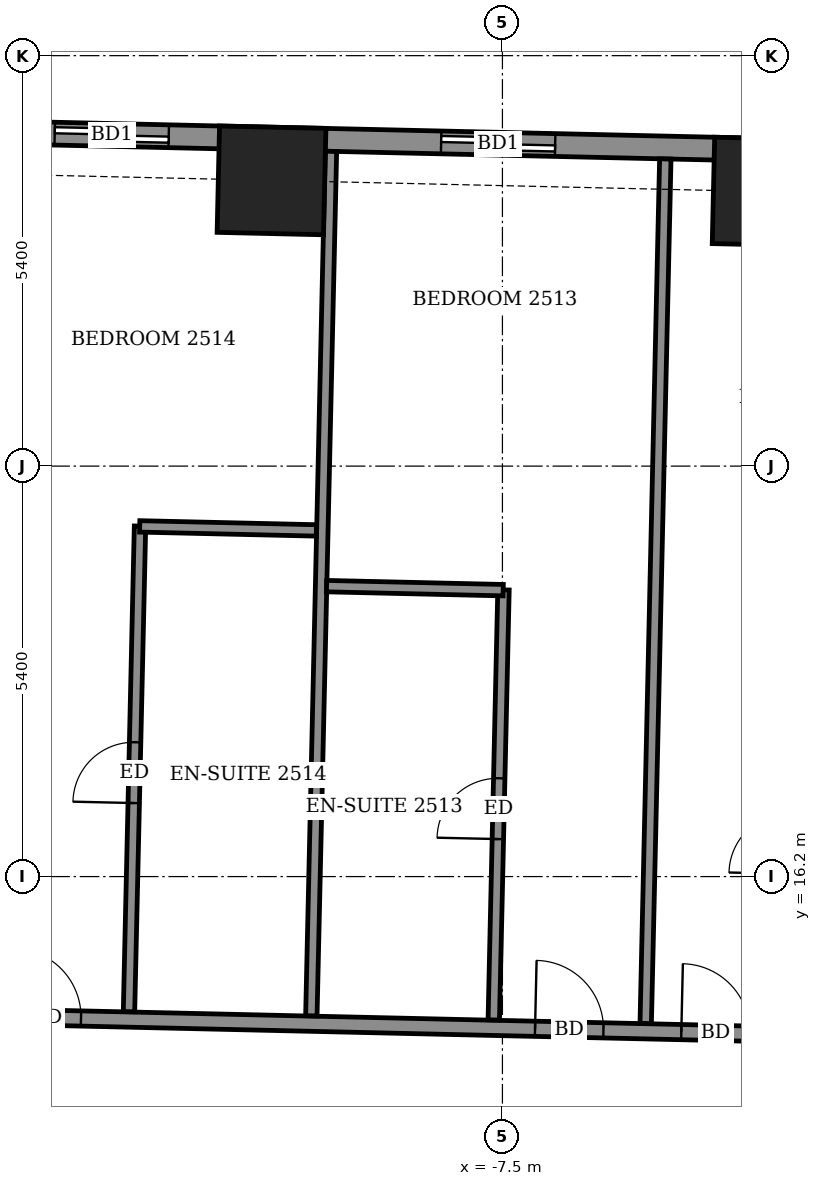
"""IFC4 building model, lengths in metres.
Left out: names, types, materials, properties, quantities, classifications, styles, units other than length and angle.
Written with IfcOpenShell. Run it as: python <this file> out.ifc"""

import sys

from ifc_helpers import new_model, si_unit, direction, frame, frame_2d, origin, origin_2d, place, context, subcontext, project, spatial, rectangle, extrude, element, fill, save


model = new_model("IFC4")
c1 = context("Model", 3, precision=1e-05, world=origin(), true_north=direction((0.0, 1.0)))
c2 = subcontext(c1, "Body", "Model", "MODEL_VIEW")
j1 = project(units=[si_unit("LENGTHUNIT", "METRE"), si_unit("PLANEANGLEUNIT", "RADIAN")], contexts=[c1])
p1 = place(None, origin())
s1 = spatial("IfcSite", under=j1, at=p1, CompositionType="ELEMENT")
p2 = place(p1, origin())
s2 = spatial("IfcBuilding", under=s1, at=p2, CompositionType="ELEMENT")
p3 = place(p2, frame((0.0, 0.0, 101.9)))
s3 = spatial("IfcBuildingStorey", under=s2, at=p3, CompositionType="ELEMENT", Elevation=101.9)
for number, where, z_axis, x_axis in (
    (1, (-4.024, 25.211, -0.55), (0.0, 0.0, 1.0), (-1.0, 0.023, 0.0)),
    (2, (-10.538, 25.359, -0.55), (0.0, 0.0, 1.0), (-1.0, 0.023, 0.0)),
):
    element("IfcColumn", number, at=place(p3, frame(where, z_axis=z_axis, x_axis=x_axis)), inside=s3, PredefinedType="COLUMN", context=c2, shape_type="SweptSolid", body=[
        extrude(rectangle(XDim=1.4, YDim=1.4, at=origin_2d()), origin(), (0.0, 0.0, 1.0), 3.6),
    ])
p4 = place(p3, frame((21.894, 25.173, 0.0), z_axis=(0.0, 0.0, 1.0), x_axis=(-0.999742661083, 0.022685052594, 0.0)))
e3 = element("IfcWall", 3, at=p4, inside=s3, PredefinedType="SOLIDWALL", context=c2, shape_type="SweptSolid", body=[
    extrude(rectangle(XDim=45.309, YDim=0.3, at=frame_2d((22.654, 0.0))), origin(), (0.0, 0.0, 1.0), 3.05),
])
p5 = place(p4, frame((2.319, 0.0, 0.0)))
e4 = element("IfcOpeningElement", 4, at=p5, cuts=e3, PredefinedType="OPENING", context=c2, shape_type="SweptSolid", body=[
    extrude(rectangle(XDim=1.5, YDim=2.4, at=frame_2d((0.75, 1.2))), frame((0.0, 0.16, 0.0), z_axis=(0.0, -1.0, 0.0), x_axis=(1.0, 0.0, 0.0)), (0.0, 0.0, 1.0), 0.32),
])
p6 = place(p4, frame((7.437, 0.0, 0.0)))
e5 = element("IfcOpeningElement", 5, at=p6, cuts=e3, PredefinedType="OPENING", context=c2, shape_type="SweptSolid", body=[
    extrude(rectangle(XDim=1.5, YDim=2.4, at=frame_2d((0.75, 1.2))), frame((0.0, 0.16, 0.0), z_axis=(0.0, -1.0, 0.0), x_axis=(1.0, 0.0, 0.0)), (0.0, 0.0, 1.0), 0.32),
])
p7 = place(p4, frame((10.244, 0.0, 0.0)))
e6 = element("IfcOpeningElement", 6, at=p7, cuts=e3, PredefinedType="OPENING", context=c2, shape_type="SweptSolid", body=[
    extrude(rectangle(XDim=1.5, YDim=2.4, at=frame_2d((0.75, 1.2))), frame((0.0, 0.16, 0.0), z_axis=(0.0, -1.0, 0.0), x_axis=(1.0, 0.0, 0.0)), (0.0, 0.0, 1.0), 0.32),
])
p8 = place(p4, frame((15.583, 0.0, 0.0)))
e7 = element("IfcOpeningElement", 7, at=p8, cuts=e3, PredefinedType="OPENING", context=c2, shape_type="SweptSolid", body=[
    extrude(rectangle(XDim=1.5, YDim=2.4, at=frame_2d((0.75, 1.2))), frame((0.0, 0.16, 0.0), z_axis=(0.0, -1.0, 0.0), x_axis=(1.0, 0.0, 0.0)), (0.0, 0.0, 1.0), 0.32),
])
p9 = place(p4, frame((20.677, 0.0, 0.0)))
e8 = element("IfcOpeningElement", 8, at=p9, cuts=e3, PredefinedType="OPENING", context=c2, shape_type="SweptSolid", body=[
    extrude(rectangle(XDim=1.5, YDim=2.4, at=frame_2d((0.75, 1.2))), frame((0.0, 0.16, 0.0), z_axis=(0.0, -1.0, 0.0), x_axis=(1.0, 0.0, 0.0)), (0.0, 0.0, 1.0), 0.32),
])
p10 = place(p4, frame((23.485, 0.0, 0.0)))
e9 = element("IfcOpeningElement", 9, at=p10, cuts=e3, PredefinedType="OPENING", context=c2, shape_type="SweptSolid", body=[
    extrude(rectangle(XDim=1.5, YDim=2.4, at=frame_2d((0.75, 1.2))), frame((0.0, 0.16, 0.0), z_axis=(0.0, -1.0, 0.0), x_axis=(1.0, 0.0, 0.0)), (0.0, 0.0, 1.0), 0.32),
])
p11 = place(p4, frame((28.708, 0.0, 0.0)))
e10 = element("IfcOpeningElement", 10, at=p11, cuts=e3, PredefinedType="OPENING", context=c2, shape_type="SweptSolid", body=[
    extrude(rectangle(XDim=1.5, YDim=2.4, at=frame_2d((0.75, 1.2))), frame((0.0, 0.16, 0.0), z_axis=(0.0, -1.0, 0.0), x_axis=(1.0, 0.0, 0.0)), (0.0, 0.0, 1.0), 0.32),
])
p12 = place(p4, frame((33.793, 0.0, 0.0)))
e11 = element("IfcOpeningElement", 11, at=p12, cuts=e3, PredefinedType="OPENING", context=c2, shape_type="SweptSolid", body=[
    extrude(rectangle(XDim=1.5, YDim=2.4, at=frame_2d((0.75, 1.2))), frame((0.0, 0.16, 0.0), z_axis=(0.0, -1.0, 0.0), x_axis=(1.0, 0.0, 0.0)), (0.0, 0.0, 1.0), 0.32),
])
p13 = place(p4, frame((36.6, 0.0, 0.0)))
e12 = element("IfcOpeningElement", 12, at=p13, cuts=e3, PredefinedType="OPENING", context=c2, shape_type="SweptSolid", body=[
    extrude(rectangle(XDim=1.5, YDim=2.4, at=frame_2d((0.75, 1.2))), frame((0.0, 0.16, 0.0), z_axis=(0.0, -1.0, 0.0), x_axis=(1.0, 0.0, 0.0)), (0.0, 0.0, 1.0), 0.32),
])
p14 = place(p4, frame((41.318, 0.0, 0.9)))
e13 = element("IfcOpeningElement", 13, at=p14, cuts=e3, PredefinedType="OPENING", context=c2, shape_type="SweptSolid", body=[
    extrude(rectangle(XDim=2.4, YDim=1.5, at=frame_2d((1.2, 0.75))), frame((0.0, 0.16, 0.0), z_axis=(0.0, -1.0, 0.0), x_axis=(1.0, 0.0, 0.0)), (0.0, 0.0, 1.0), 0.32),
])
p15 = place(p3, frame((-26.316, 14.634, 0.0), z_axis=(0.0, 0.0, 1.0), x_axis=(0.999742734556, -0.02268181435, 0.0)))
e14 = element("IfcWall", 14, at=p15, inside=s3, PredefinedType="PARTITIONING", context=c2, shape_type="SweptSolid", body=[
    extrude(rectangle(XDim=50.708, YDim=0.2, at=frame_2d((25.354, 0.0))), origin(), (0.0, 0.0, 1.0), 3.05),
])
p16 = place(p15, frame((48.229, 0.0, 0.0)))
e15 = element("IfcOpeningElement", 15, at=p16, cuts=e14, PredefinedType="OPENING", context=c2, shape_type="SweptSolid", body=[
    extrude(rectangle(XDim=1.0, YDim=2.1, at=frame_2d((0.5, 1.05))), frame((0.0, 0.11, 0.0), z_axis=(0.0, -1.0, 0.0), x_axis=(1.0, 0.0, 0.0)), (0.0, 0.0, 1.0), 0.22),
])
p17 = place(p15, frame((43.6, 0.0, 0.0)))
e16 = element("IfcOpeningElement", 16, at=p17, cuts=e14, PredefinedType="OPENING", context=c2, shape_type="SweptSolid", body=[
    extrude(rectangle(XDim=0.9, YDim=2.1, at=frame_2d((0.45, 1.05))), frame((0.0, 0.11, 0.0), z_axis=(0.0, -1.0, 0.0), x_axis=(1.0, 0.0, 0.0)), (0.0, 0.0, 1.0), 0.22),
])
p18 = place(p15, frame((38.925, 0.0, 0.0)))
e17 = element("IfcOpeningElement", 17, at=p18, cuts=e14, PredefinedType="OPENING", context=c2, shape_type="SweptSolid", body=[
    extrude(rectangle(XDim=0.9, YDim=2.1, at=frame_2d((0.45, 1.05))), frame((0.0, 0.11, 0.0), z_axis=(0.0, -1.0, 0.0), x_axis=(1.0, 0.0, 0.0)), (0.0, 0.0, 1.0), 0.22),
])
p19 = place(p15, frame((36.9, 0.0, 0.0)))
e18 = element("IfcOpeningElement", 18, at=p19, cuts=e14, PredefinedType="OPENING", context=c2, shape_type="SweptSolid", body=[
    extrude(rectangle(XDim=0.9, YDim=2.1, at=frame_2d((0.45, 1.05))), frame((0.0, 0.11, 0.0), z_axis=(0.0, -1.0, 0.0), x_axis=(1.0, 0.0, 0.0)), (0.0, 0.0, 1.0), 0.22),
])
p20 = place(p15, frame((29.975, 0.0, 0.0)))
e19 = element("IfcOpeningElement", 19, at=p20, cuts=e14, PredefinedType="OPENING", context=c2, shape_type="SweptSolid", body=[
    extrude(rectangle(XDim=0.9, YDim=2.1, at=frame_2d((0.45, 1.05))), frame((0.0, 0.11, 0.0), z_axis=(0.0, -1.0, 0.0), x_axis=(1.0, 0.0, 0.0)), (0.0, 0.0, 1.0), 0.22),
])
p21 = place(p15, frame((27.9, 0.0, 0.0)))
e20 = element("IfcOpeningElement", 20, at=p21, cuts=e14, PredefinedType="OPENING", context=c2, shape_type="SweptSolid", body=[
    extrude(rectangle(XDim=0.9, YDim=2.1, at=frame_2d((0.45, 1.05))), frame((0.0, 0.11, 0.0), z_axis=(0.0, -1.0, 0.0), x_axis=(1.0, 0.0, 0.0)), (0.0, 0.0, 1.0), 0.22),
])
p22 = place(p15, frame((21.175, 0.0, 0.0)))
e21 = element("IfcOpeningElement", 21, at=p22, cuts=e14, PredefinedType="OPENING", context=c2, shape_type="SweptSolid", body=[
    extrude(rectangle(XDim=0.9, YDim=2.1, at=frame_2d((0.45, 1.05))), frame((0.0, 0.11, 0.0), z_axis=(0.0, -1.0, 0.0), x_axis=(1.0, 0.0, 0.0)), (0.0, 0.0, 1.0), 0.22),
])
p23 = place(p15, frame((19.25, 0.0, 0.0)))
e22 = element("IfcOpeningElement", 22, at=p23, cuts=e14, PredefinedType="OPENING", context=c2, shape_type="SweptSolid", body=[
    extrude(rectangle(XDim=0.9, YDim=2.1, at=frame_2d((0.45, 1.05))), frame((0.0, 0.11, 0.0), z_axis=(0.0, -1.0, 0.0), x_axis=(1.0, 0.0, 0.0)), (0.0, 0.0, 1.0), 0.22),
])
p24 = place(p15, frame((12.375, 0.0, 0.0)))
e23 = element("IfcOpeningElement", 23, at=p24, cuts=e14, PredefinedType="OPENING", context=c2, shape_type="SweptSolid", body=[
    extrude(rectangle(XDim=0.9, YDim=2.1, at=frame_2d((0.45, 1.05))), frame((0.0, 0.11, 0.0), z_axis=(0.0, -1.0, 0.0), x_axis=(1.0, 0.0, 0.0)), (0.0, 0.0, 1.0), 0.22),
])
p25 = place(p15, frame((10.225, 0.0, 0.0)))
e24 = element("IfcOpeningElement", 24, at=p25, cuts=e14, PredefinedType="OPENING", context=c2, shape_type="SweptSolid", body=[
    extrude(rectangle(XDim=0.9, YDim=2.1, at=frame_2d((0.45, 1.05))), frame((0.0, 0.11, 0.0), z_axis=(0.0, -1.0, 0.0), x_axis=(1.0, 0.0, 0.0)), (0.0, 0.0, 1.0), 0.22),
])
p26 = place(p15, frame((0.85, 0.0, 0.0)))
e25 = element("IfcOpeningElement", 25, at=p26, cuts=e14, PredefinedType="OPENING", context=c2, shape_type="SweptSolid", body=[
    extrude(rectangle(XDim=1.0, YDim=2.1, at=frame_2d((0.5, 1.05))), frame((0.0, 0.11, 0.0), z_axis=(0.0, -1.0, 0.0), x_axis=(1.0, 0.0, 0.0)), (0.0, 0.0, 1.0), 0.22),
])
p27 = place(p15, frame((5.55, 0.0, 0.0)))
e26 = element("IfcOpeningElement", 26, at=p27, cuts=e14, PredefinedType="OPENING", context=c2, shape_type="SweptSolid", body=[
    extrude(rectangle(XDim=0.9, YDim=2.1, at=frame_2d((0.45, 1.05))), frame((0.0, 0.11, 0.0), z_axis=(0.0, -1.0, 0.0), x_axis=(1.0, 0.0, 0.0)), (0.0, 0.0, 1.0), 0.22),
])
p28 = place(p3, frame((-12.413, 14.423, 0.0), z_axis=(0.0, 0.0, 1.0), x_axis=(0.022696235044, 0.99974240728, 0.0)))
e27 = element("IfcWall", 27, at=p28, inside=s3, PredefinedType="PARTITIONING", context=c2, shape_type="SweptSolid", body=[
    extrude(rectangle(XDim=6.39, YDim=0.15, at=frame_2d((3.195, 0.0))), origin(), (0.0, 0.0, 1.0), 3.05),
])
p29 = place(p28, frame((2.745, 0.0, 0.0)))
e28 = element("IfcOpeningElement", 28, at=p29, cuts=e27, PredefinedType="OPENING", context=c2, shape_type="SweptSolid", body=[
    extrude(rectangle(XDim=0.8, YDim=2.1, at=frame_2d((0.4, 1.05))), frame((0.0, 0.085, 0.0), z_axis=(0.0, -1.0, 0.0), x_axis=(1.0, 0.0, 0.0)), (0.0, 0.0, 1.0), 0.17),
])
p30 = place(p3, frame((-10.014, 14.368, 0.0), z_axis=(0.0, 0.0, 1.0), x_axis=(0.022662905301, 0.999743163379, 0.0)))
e29 = element("IfcWall", 29, at=p30, inside=s3, PredefinedType="PARTITIONING", context=c2, shape_type="SweptSolid", body=[
    extrude(rectangle(XDim=11.376, YDim=0.15, at=frame_2d((5.688, 0.0))), origin(), (0.0, 0.0, 1.0), 2.55),
])
p31 = place(p3, frame((-7.614, 14.314, 0.0), z_axis=(0.0, 0.0, 1.0), x_axis=(0.022604794261, 0.999744478993, 0.0)))
e30 = element("IfcWall", 30, at=p31, inside=s3, PredefinedType="PARTITIONING", context=c2, shape_type="SweptSolid", body=[
    extrude(rectangle(XDim=5.659, YDim=0.15, at=frame_2d((2.83, 0.0))), origin(), (0.0, 0.0, 1.0), 3.05),
])
p32 = place(p31, frame((2.38, 0.0, 0.0)))
e31 = element("IfcOpeningElement", 31, at=p32, cuts=e30, PredefinedType="OPENING", context=c2, shape_type="SweptSolid", body=[
    extrude(rectangle(XDim=0.8, YDim=2.1, at=frame_2d((0.4, 1.05))), frame((0.0, 0.085, 0.0), z_axis=(0.0, -1.0, 0.0), x_axis=(1.0, 0.0, 0.0)), (0.0, 0.0, 1.0), 0.17),
])
p33 = place(p3, frame((-5.615, 14.268, 0.0), z_axis=(0.0, 0.0, 1.0), x_axis=(0.022684355347, 0.999742676904, 0.0)))
e32 = element("IfcWall", 32, at=p33, inside=s3, PredefinedType="PARTITIONING", context=c2, shape_type="SweptSolid", body=[
    extrude(rectangle(XDim=11.376, YDim=0.15, at=frame_2d((5.688, 0.0))), origin(), (0.0, 0.0, 1.0), 2.55),
])
for number, where, z_axis, x_axis in (
    (33, (-9.814, 20.021, 0.0), (0.0, 0.0, 1.0), (1.0, -0.023, 0.0)),
    (34, (-12.272, 20.807, 0.0), (0.0, 0.0, 1.0), (1.0, -0.023, 0.0)),
):
    element("IfcWall", number, at=place(p3, frame(where, z_axis=z_axis, x_axis=x_axis)), inside=s3, PredefinedType="PARTITIONING", context=c2, shape_type="SweptSolid", body=[
        extrude(rectangle(XDim=2.324, YDim=0.15, at=frame_2d((1.162, 0.0))), origin(), (0.0, 0.0, 1.0), 3.05),
    ])
p34 = place(p11, origin())
e35 = element("IfcDoor", 35, at=p34, inside=s3, OperationType="SLIDING_TO_LEFT", PredefinedType="DOOR", context=c2, shape_type="SweptSolid", body=[
    extrude(rectangle(XDim=1.5, YDim=2.4, at=frame_2d((0.75, 1.2))), frame((0.0, 0.025, 0.0), z_axis=(0.0, -1.0, 0.0), x_axis=(1.0, 0.0, 0.0)), (0.0, 0.0, 1.0), 0.05),
])
fill(e10, e35)
p35 = place(p12, origin())
e36 = element("IfcDoor", 36, at=p35, inside=s3, OperationType="SLIDING_TO_LEFT", PredefinedType="DOOR", context=c2, shape_type="SweptSolid", body=[
    extrude(rectangle(XDim=1.5, YDim=2.4, at=frame_2d((0.75, 1.2))), frame((0.0, 0.025, 0.0), z_axis=(0.0, -1.0, 0.0), x_axis=(1.0, 0.0, 0.0)), (0.0, 0.0, 1.0), 0.05),
])
fill(e11, e36)
p36 = place(p22, origin())
e37 = element("IfcDoor", 37, at=p36, inside=s3, OperationType="SINGLE_SWING_RIGHT", PredefinedType="DOOR", context=c2, shape_type="SweptSolid", body=[
    extrude(rectangle(XDim=0.9, YDim=2.1, at=frame_2d((0.45, 1.05))), frame((0.0, 0.025, 0.0), z_axis=(0.0, -1.0, 0.0), x_axis=(1.0, 0.0, 0.0)), (0.0, 0.0, 1.0), 0.05),
])
fill(e21, e37)
p37 = place(p23, origin())
e38 = element("IfcDoor", 38, at=p37, inside=s3, OperationType="SINGLE_SWING_LEFT", PredefinedType="DOOR", context=c2, shape_type="SweptSolid", body=[
    extrude(rectangle(XDim=0.9, YDim=2.1, at=frame_2d((0.45, 1.05))), frame((0.0, 0.025, 0.0), z_axis=(0.0, -1.0, 0.0), x_axis=(1.0, 0.0, 0.0)), (0.0, 0.0, 1.0), 0.05),
])
fill(e22, e38)
p38 = place(p32, origin())
e39 = element("IfcDoor", 39, at=p38, inside=s3, OperationType="SINGLE_SWING_LEFT", PredefinedType="DOOR", context=c2, shape_type="SweptSolid", body=[
    extrude(rectangle(XDim=0.8, YDim=2.1, at=frame_2d((0.4, 1.05))), frame((0.0, 0.025, 0.0), z_axis=(0.0, -1.0, 0.0), x_axis=(1.0, 0.0, 0.0)), (0.0, 0.0, 1.0), 0.05),
])
fill(e31, e39)
p39 = place(p24, origin())
e40 = element("IfcDoor", 40, at=p39, inside=s3, OperationType="SINGLE_SWING_RIGHT", PredefinedType="DOOR", context=c2, shape_type="SweptSolid", body=[
    extrude(rectangle(XDim=0.9, YDim=2.1, at=frame_2d((0.45, 1.05))), frame((0.0, 0.025, 0.0), z_axis=(0.0, -1.0, 0.0), x_axis=(1.0, 0.0, 0.0)), (0.0, 0.0, 1.0), 0.05),
])
fill(e23, e40)
p40 = place(p29, origin())
e41 = element("IfcDoor", 41, at=p40, inside=s3, OperationType="SINGLE_SWING_RIGHT", PredefinedType="DOOR", context=c2, shape_type="SweptSolid", body=[
    extrude(rectangle(XDim=0.8, YDim=2.1, at=frame_2d((0.4, 1.05))), frame((0.0, 0.025, 0.0), z_axis=(0.0, -1.0, 0.0), x_axis=(1.0, 0.0, 0.0)), (0.0, 0.0, 1.0), 0.05),
])
fill(e28, e41)
save(model, sys.argv[1])
